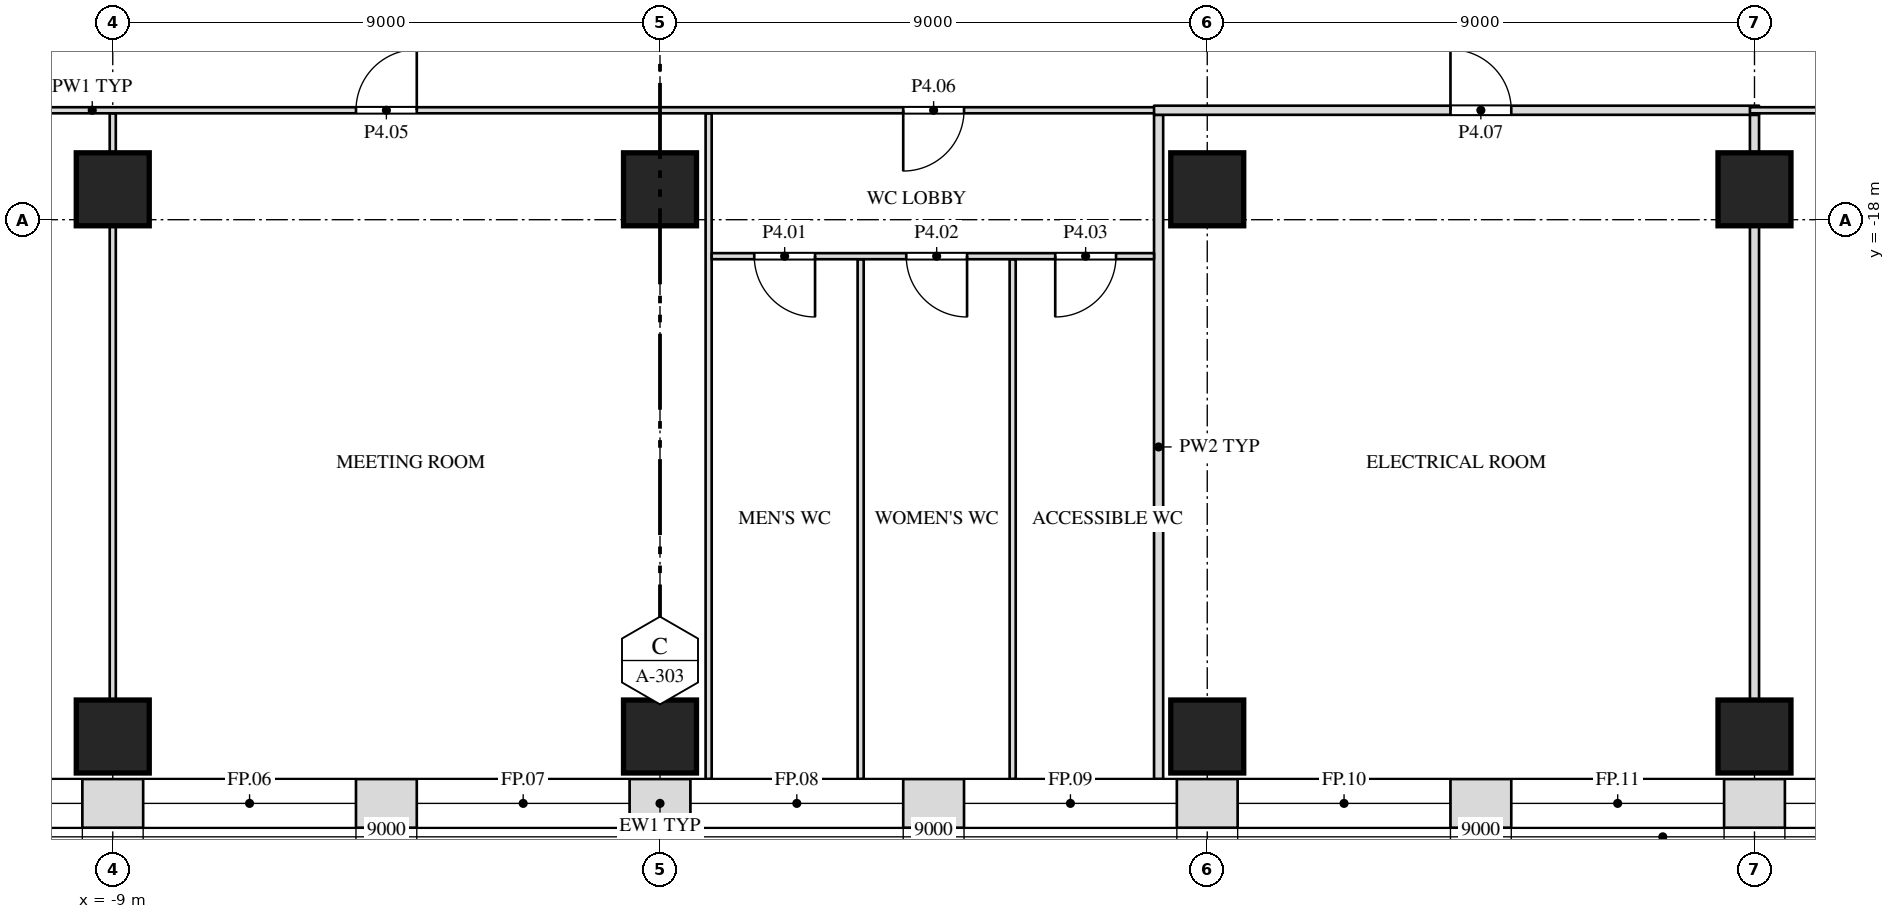
"""IFC4 building model, lengths in metres.
Left out: names, types, materials, properties, quantities, classifications, styles, units other than length and angle.
Written with IfcOpenShell. Run it as: python <this file> out.ifc"""

import sys

from ifc_helpers import new_model, si_unit, direction, frame, frame_2d, origin, origin_2d, place, context, subcontext, project, spatial, rectangle, extrude, element, fill, save


model = new_model("IFC4")
c1 = context("Model", 3, precision=1e-05, world=origin(), true_north=direction((0.0, 1.0)))
c2 = subcontext(c1, "Body", "Model", "MODEL_VIEW")
j1 = project(units=[si_unit("LENGTHUNIT", "METRE"), si_unit("PLANEANGLEUNIT", "RADIAN")], contexts=[c1])
p1 = place(None, origin())
s1 = spatial("IfcSite", under=j1, at=p1, CompositionType="ELEMENT")
p2 = place(p1, origin())
s2 = spatial("IfcBuilding", under=s1, at=p2, CompositionType="ELEMENT")
p3 = place(p2, frame((0.0, 0.0, 27.0)))
s3 = spatial("IfcBuildingStorey", under=s2, at=p3, CompositionType="ELEMENT", Elevation=27.0)
for number, where, z_axis, x_axis in (
    (1, (-9.0, -26.5, 0.0), (0.0, 0.0, 1.0), (1.0, 0.0, 0.0)),
    (2, (0.0, -26.5, 0.0), (0.0, 0.0, 1.0), (1.0, 0.0, 0.0)),
    (3, (9.0, -26.5, 0.0), (0.0, 0.0, 1.0), (1.0, 0.0, 0.0)),
    (4, (18.0, -26.5, 0.0), (0.0, 0.0, 1.0), (1.0, 0.0, 0.0)),
    (5, (-9.0, -17.5, 0.0), (0.0, 0.0, 1.0), (1.0, 0.0, 0.0)),
    (6, (0.0, -17.5, 0.0), (0.0, 0.0, 1.0), (1.0, 0.0, 0.0)),
    (7, (9.0, -17.5, 0.0), (0.0, 0.0, 1.0), (1.0, 0.0, 0.0)),
    (8, (18.0, -17.5, 0.0), (0.0, 0.0, 1.0), (1.0, 0.0, 0.0)),
):
    element("IfcColumn", number, at=place(p3, frame(where, z_axis=z_axis, x_axis=x_axis)), inside=s3, PredefinedType="COLUMN", context=c2, shape_type="SweptSolid", body=[
        extrude(rectangle(XDim=1.2, YDim=1.2, at=origin_2d()), origin(), (0.0, 0.0, 1.0), 6.0),
    ])
p4 = place(p3, frame((-9.0, -25.9, 0.0), z_axis=(0.0, 0.0, 1.0), x_axis=(0.0, 1.0, 0.0)))
e9 = element("IfcWall", 9, at=p4, inside=s3, PredefinedType="PARTITIONING", context=c2, shape_type="SweptSolid", body=[
    extrude(rectangle(XDim=7.8, YDim=0.1, at=frame_2d((3.9, 0.0))), origin(), (0.0, 0.0, 1.0), 5.088),
])
p5 = place(p3, frame((-9.0, -16.9, 0.0), z_axis=(0.0, 0.0, 1.0), x_axis=(0.0, 1.0, 0.0)))
e10 = element("IfcWall", 10, at=p5, inside=s3, PredefinedType="PARTITIONING", context=c2, shape_type="SweptSolid", body=[
    extrude(rectangle(XDim=0.65, YDim=0.1, at=frame_2d((0.325, 0.0))), origin(), (0.0, 0.0, 1.0), 5.7),
])
p6 = place(p3, frame((0.8, -27.2, 0.0), z_axis=(0.0, 0.0, 1.0), x_axis=(0.0, 1.0, 0.0)))
e11 = element("IfcWall", 11, at=p6, inside=s3, PredefinedType="PARTITIONING", context=c2, shape_type="SweptSolid", body=[
    extrude(rectangle(XDim=10.95, YDim=0.1, at=frame_2d((5.475, 0.0))), origin(), (0.0, 0.0, 1.0), 5.7),
])
for number, where, z_axis, x_axis in (
    (12, (3.3, -27.2, 0.0), (0.0, 0.0, 1.0), (0.0, 1.0, 0.0)),
    (13, (5.8, -27.2, 0.0), (0.0, 0.0, 1.0), (0.0, 1.0, 0.0)),
):
    element("IfcWall", number, at=place(p3, frame(where, z_axis=z_axis, x_axis=x_axis)), inside=s3, PredefinedType="PARTITIONING", context=c2, shape_type="SweptSolid", body=[
        extrude(rectangle(XDim=8.55, YDim=0.1, at=frame_2d((4.275, 0.0))), origin(), (0.0, 0.0, 1.0), 5.7),
    ])
p7 = place(p3, frame((8.2, -27.2, 0.0), z_axis=(0.0, 0.0, 1.0), x_axis=(0.0, 1.0, 0.0)))
e14 = element("IfcWall", 14, at=p7, inside=s3, PredefinedType="PARTITIONING", context=c2, shape_type="SweptSolid", body=[
    extrude(rectangle(XDim=10.925, YDim=0.15, at=frame_2d((5.462, 0.0))), origin(), (0.0, 0.0, 1.0), 5.7),
])
p8 = place(p3, frame((18.0, -25.9, 0.0), z_axis=(0.0, 0.0, 1.0), x_axis=(0.0, 1.0, 0.0)))
e15 = element("IfcWall", 15, at=p8, inside=s3, PredefinedType="PARTITIONING", context=c2, shape_type="SweptSolid", body=[
    extrude(rectangle(XDim=7.8, YDim=0.15, at=frame_2d((3.9, 0.0))), origin(), (0.0, 0.0, 1.0), 5.088),
])
p9 = place(p3, frame((18.0, -16.9, 0.0), z_axis=(0.0, 0.0, 1.0), x_axis=(0.0, 1.0, 0.0)))
e16 = element("IfcWall", 16, at=p9, inside=s3, PredefinedType="PARTITIONING", context=c2, shape_type="SweptSolid", body=[
    extrude(rectangle(XDim=0.625, YDim=0.15, at=frame_2d((0.312, 0.0))), origin(), (0.0, 0.0, 1.0), 5.7),
])
p10 = place(p3, frame((0.85, -18.6, 0.0), z_axis=(0.0, 0.0, 1.0), x_axis=(1.0, 0.0, 0.0)))
e17 = element("IfcWall", 17, at=p10, inside=s3, PredefinedType="PARTITIONING", context=c2, shape_type="SweptSolid", body=[
    extrude(rectangle(XDim=7.275, YDim=0.1, at=frame_2d((3.637, 0.0))), origin(), (0.0, 0.0, 1.0), 5.7),
])
p11 = place(p10, frame((0.7, 0.0, 0.0)))
e18 = element("IfcOpeningElement", 18, at=p11, cuts=e17, PredefinedType="OPENING", context=c2, shape_type="SweptSolid", body=[
    extrude(rectangle(XDim=1.0, YDim=2.1, at=frame_2d((0.5, 1.05))), frame((0.0, 0.062, 0.0), z_axis=(0.0, -1.0, 0.0), x_axis=(1.0, 0.0, 0.0)), (0.0, 0.0, 1.0), 0.124),
])
p12 = place(p10, frame((3.2, 0.0, 0.0)))
e19 = element("IfcOpeningElement", 19, at=p12, cuts=e17, PredefinedType="OPENING", context=c2, shape_type="SweptSolid", body=[
    extrude(rectangle(XDim=1.0, YDim=2.1, at=frame_2d((0.5, 1.05))), frame((0.0, 0.062, 0.0), z_axis=(0.0, -1.0, 0.0), x_axis=(1.0, 0.0, 0.0)), (0.0, 0.0, 1.0), 0.124),
])
p13 = place(p10, frame((5.65, 0.0, 0.0)))
e20 = element("IfcOpeningElement", 20, at=p13, cuts=e17, PredefinedType="OPENING", context=c2, shape_type="SweptSolid", body=[
    extrude(rectangle(XDim=1.0, YDim=2.1, at=frame_2d((0.5, 1.05))), frame((0.0, 0.062, 0.0), z_axis=(0.0, -1.0, 0.0), x_axis=(1.0, 0.0, 0.0)), (0.0, 0.0, 1.0), 0.124),
])
p14 = place(p3, frame((-26.95, -16.2, 0.0), z_axis=(0.0, 0.0, 1.0), x_axis=(1.0, 0.0, 0.0)))
e21 = element("IfcWall", 21, at=p14, inside=s3, PredefinedType="PARTITIONING", context=c2, shape_type="SweptSolid", body=[
    extrude(rectangle(XDim=35.225, YDim=0.1, at=frame_2d((17.612, 0.0))), origin(), (0.0, 0.0, 1.0), 5.7),
])
p15 = place(p14, frame((3.95, 0.0, 0.0)))
e22 = element("IfcOpeningElement", 22, at=p15, cuts=e21, PredefinedType="OPENING", context=c2, shape_type="SweptSolid", body=[
    extrude(rectangle(XDim=1.0, YDim=2.1, at=frame_2d((0.5, 1.05))), frame((0.0, 0.062, 0.0), z_axis=(0.0, -1.0, 0.0), x_axis=(1.0, 0.0, 0.0)), (0.0, 0.0, 1.0), 0.124),
])
p16 = place(p14, frame((21.95, 0.0, 0.0)))
e23 = element("IfcOpeningElement", 23, at=p16, cuts=e21, PredefinedType="OPENING", context=c2, shape_type="SweptSolid", body=[
    extrude(rectangle(XDim=1.0, YDim=2.1, at=frame_2d((0.5, 1.05))), frame((0.0, 0.062, 0.0), z_axis=(0.0, -1.0, 0.0), x_axis=(1.0, 0.0, 0.0)), (0.0, 0.0, 1.0), 0.124),
])
p17 = place(p14, frame((30.95, 0.0, 0.0)))
e24 = element("IfcOpeningElement", 24, at=p17, cuts=e21, PredefinedType="OPENING", context=c2, shape_type="SweptSolid", body=[
    extrude(rectangle(XDim=1.0, YDim=2.1, at=frame_2d((0.5, 1.05))), frame((0.0, 0.062, 0.0), z_axis=(0.0, -1.0, 0.0), x_axis=(1.0, 0.0, 0.0)), (0.0, 0.0, 1.0), 0.124),
])
p18 = place(p3, frame((8.125, -16.2, 0.0), z_axis=(0.0, 0.0, 1.0), x_axis=(1.0, 0.0, 0.0)))
e25 = element("IfcWall", 25, at=p18, inside=s3, PredefinedType="PARTITIONING", context=c2, shape_type="SweptSolid", body=[
    extrude(rectangle(XDim=9.95, YDim=0.15, at=frame_2d((4.975, 0.0))), origin(), (0.0, 0.0, 1.0), 5.7),
])
p19 = place(p18, frame((4.875, 0.0, 0.0)))
e26 = element("IfcOpeningElement", 26, at=p19, cuts=e25, PredefinedType="OPENING", context=c2, shape_type="SweptSolid", body=[
    extrude(rectangle(XDim=1.0, YDim=2.1, at=frame_2d((0.5, 1.05))), frame((0.0, 0.087, 0.0), z_axis=(0.0, -1.0, 0.0), x_axis=(1.0, 0.0, 0.0)), (0.0, 0.0, 1.0), 0.174),
])
p20 = place(p3, frame((17.925, -16.2, 0.0), z_axis=(0.0, 0.0, 1.0), x_axis=(1.0, 0.0, 0.0)))
e27 = element("IfcWall", 27, at=p20, inside=s3, PredefinedType="PARTITIONING", context=c2, shape_type="SweptSolid", body=[
    extrude(rectangle(XDim=9.025, YDim=0.1, at=frame_2d((4.512, 0.0))), origin(), (0.0, 0.0, 1.0), 5.7),
])
p21 = place(p20, frame((4.075, 0.0, 0.0)))
e28 = element("IfcOpeningElement", 28, at=p21, cuts=e27, PredefinedType="OPENING", context=c2, shape_type="SweptSolid", body=[
    extrude(rectangle(XDim=1.0, YDim=2.1, at=frame_2d((0.5, 1.05))), frame((0.0, 0.062, 0.0), z_axis=(0.0, -1.0, 0.0), x_axis=(1.0, 0.0, 0.0)), (0.0, 0.0, 1.0), 0.124),
])
p22 = place(p3, frame((-32.948, -27.6, 0.0), z_axis=(0.0, 0.0, 1.0), x_axis=(1.0, 0.0, 0.0)))
e29 = element("IfcWall", 29, at=p22, inside=s3, PredefinedType="SOLIDWALL", context=c2, shape_type="SweptSolid", body=[
    extrude(rectangle(XDim=65.895, YDim=0.8, at=frame_2d((32.948, 0.0))), origin(), (0.0, 0.0, 1.0), 5.7),
])
p23 = place(p22, frame((1.948, 0.0, 1.0)))
e30 = element("IfcOpeningElement", 30, at=p23, cuts=e29, PredefinedType="OPENING", context=c2, shape_type="SweptSolid", body=[
    extrude(rectangle(XDim=3.5, YDim=4.0, at=frame_2d((1.75, 2.0))), frame((0.0, 0.412, 0.0), z_axis=(0.0, -1.0, 0.0), x_axis=(1.0, 0.0, 0.0)), (0.0, 0.0, 1.0), 0.824),
])
p24 = place(p22, frame((6.448, 0.0, 1.0)))
e31 = element("IfcOpeningElement", 31, at=p24, cuts=e29, PredefinedType="OPENING", context=c2, shape_type="SweptSolid", body=[
    extrude(rectangle(XDim=3.5, YDim=4.0, at=frame_2d((1.75, 2.0))), frame((0.0, 0.412, 0.0), z_axis=(0.0, -1.0, 0.0), x_axis=(1.0, 0.0, 0.0)), (0.0, 0.0, 1.0), 0.824),
])
p25 = place(p22, frame((10.948, 0.0, 1.0)))
e32 = element("IfcOpeningElement", 32, at=p25, cuts=e29, PredefinedType="OPENING", context=c2, shape_type="SweptSolid", body=[
    extrude(rectangle(XDim=3.5, YDim=4.0, at=frame_2d((1.75, 2.0))), frame((0.0, 0.412, 0.0), z_axis=(0.0, -1.0, 0.0), x_axis=(1.0, 0.0, 0.0)), (0.0, 0.0, 1.0), 0.824),
])
p26 = place(p22, frame((15.448, 0.0, 1.0)))
e33 = element("IfcOpeningElement", 33, at=p26, cuts=e29, PredefinedType="OPENING", context=c2, shape_type="SweptSolid", body=[
    extrude(rectangle(XDim=3.5, YDim=4.0, at=frame_2d((1.75, 2.0))), frame((0.0, 0.412, 0.0), z_axis=(0.0, -1.0, 0.0), x_axis=(1.0, 0.0, 0.0)), (0.0, 0.0, 1.0), 0.824),
])
p27 = place(p22, frame((19.948, 0.0, 1.0)))
e34 = element("IfcOpeningElement", 34, at=p27, cuts=e29, PredefinedType="OPENING", context=c2, shape_type="SweptSolid", body=[
    extrude(rectangle(XDim=3.5, YDim=4.0, at=frame_2d((1.75, 2.0))), frame((0.0, 0.412, 0.0), z_axis=(0.0, -1.0, 0.0), x_axis=(1.0, 0.0, 0.0)), (0.0, 0.0, 1.0), 0.824),
])
p28 = place(p22, frame((24.448, 0.0, 1.0)))
e35 = element("IfcOpeningElement", 35, at=p28, cuts=e29, PredefinedType="OPENING", context=c2, shape_type="SweptSolid", body=[
    extrude(rectangle(XDim=3.5, YDim=4.0, at=frame_2d((1.75, 2.0))), frame((0.0, 0.412, 0.0), z_axis=(0.0, -1.0, 0.0), x_axis=(1.0, 0.0, 0.0)), (0.0, 0.0, 1.0), 0.824),
])
p29 = place(p22, frame((28.948, 0.0, 1.0)))
e36 = element("IfcOpeningElement", 36, at=p29, cuts=e29, PredefinedType="OPENING", context=c2, shape_type="SweptSolid", body=[
    extrude(rectangle(XDim=3.5, YDim=4.0, at=frame_2d((1.75, 2.0))), frame((0.0, 0.412, 0.0), z_axis=(0.0, -1.0, 0.0), x_axis=(1.0, 0.0, 0.0)), (0.0, 0.0, 1.0), 0.824),
])
p30 = place(p22, frame((33.448, 0.0, 1.0)))
e37 = element("IfcOpeningElement", 37, at=p30, cuts=e29, PredefinedType="OPENING", context=c2, shape_type="SweptSolid", body=[
    extrude(rectangle(XDim=3.5, YDim=4.0, at=frame_2d((1.75, 2.0))), frame((0.0, 0.412, 0.0), z_axis=(0.0, -1.0, 0.0), x_axis=(1.0, 0.0, 0.0)), (0.0, 0.0, 1.0), 0.824),
])
p31 = place(p22, frame((37.948, 0.0, 1.0)))
e38 = element("IfcOpeningElement", 38, at=p31, cuts=e29, PredefinedType="OPENING", context=c2, shape_type="SweptSolid", body=[
    extrude(rectangle(XDim=3.5, YDim=4.0, at=frame_2d((1.75, 2.0))), frame((0.0, 0.412, 0.0), z_axis=(0.0, -1.0, 0.0), x_axis=(1.0, 0.0, 0.0)), (0.0, 0.0, 1.0), 0.824),
])
p32 = place(p22, frame((42.448, 0.0, 1.0)))
e39 = element("IfcOpeningElement", 39, at=p32, cuts=e29, PredefinedType="OPENING", context=c2, shape_type="SweptSolid", body=[
    extrude(rectangle(XDim=3.5, YDim=4.0, at=frame_2d((1.75, 2.0))), frame((0.0, 0.412, 0.0), z_axis=(0.0, -1.0, 0.0), x_axis=(1.0, 0.0, 0.0)), (0.0, 0.0, 1.0), 0.824),
])
p33 = place(p22, frame((46.948, 0.0, 1.0)))
e40 = element("IfcOpeningElement", 40, at=p33, cuts=e29, PredefinedType="OPENING", context=c2, shape_type="SweptSolid", body=[
    extrude(rectangle(XDim=3.5, YDim=4.0, at=frame_2d((1.75, 2.0))), frame((0.0, 0.412, 0.0), z_axis=(0.0, -1.0, 0.0), x_axis=(1.0, 0.0, 0.0)), (0.0, 0.0, 1.0), 0.824),
])
p34 = place(p22, frame((51.448, 0.0, 1.0)))
e41 = element("IfcOpeningElement", 41, at=p34, cuts=e29, PredefinedType="OPENING", context=c2, shape_type="SweptSolid", body=[
    extrude(rectangle(XDim=3.5, YDim=4.0, at=frame_2d((1.75, 2.0))), frame((0.0, 0.412, 0.0), z_axis=(0.0, -1.0, 0.0), x_axis=(1.0, 0.0, 0.0)), (0.0, 0.0, 1.0), 0.824),
])
p35 = place(p22, frame((55.948, 0.0, 1.0)))
e42 = element("IfcOpeningElement", 42, at=p35, cuts=e29, PredefinedType="OPENING", context=c2, shape_type="SweptSolid", body=[
    extrude(rectangle(XDim=3.5, YDim=4.0, at=frame_2d((1.75, 2.0))), frame((0.0, 0.412, 0.0), z_axis=(0.0, -1.0, 0.0), x_axis=(1.0, 0.0, 0.0)), (0.0, 0.0, 1.0), 0.824),
])
p36 = place(p22, frame((60.448, 0.0, 1.0)))
e43 = element("IfcOpeningElement", 43, at=p36, cuts=e29, PredefinedType="OPENING", context=c2, shape_type="SweptSolid", body=[
    extrude(rectangle(XDim=3.5, YDim=4.0, at=frame_2d((1.75, 2.0))), frame((0.0, 0.412, 0.0), z_axis=(0.0, -1.0, 0.0), x_axis=(1.0, 0.0, 0.0)), (0.0, 0.0, 1.0), 0.824),
])
p37 = place(p11, origin())
e44 = element("IfcDoor", 44, at=p37, inside=s3, OperationType="SINGLE_SWING_LEFT", PredefinedType="DOOR", context=c2, shape_type="SweptSolid", body=[
    extrude(rectangle(XDim=1.0, YDim=2.1, at=frame_2d((0.5, 1.05))), frame((0.0, 0.025, 0.0), z_axis=(0.0, -1.0, 0.0), x_axis=(1.0, 0.0, 0.0)), (0.0, 0.0, 1.0), 0.05),
])
fill(e18, e44)
p38 = place(p12, origin())
e45 = element("IfcDoor", 45, at=p38, inside=s3, OperationType="SINGLE_SWING_LEFT", PredefinedType="DOOR", context=c2, shape_type="SweptSolid", body=[
    extrude(rectangle(XDim=1.0, YDim=2.1, at=frame_2d((0.5, 1.05))), frame((0.0, 0.025, 0.0), z_axis=(0.0, -1.0, 0.0), x_axis=(1.0, 0.0, 0.0)), (0.0, 0.0, 1.0), 0.05),
])
fill(e19, e45)
p39 = place(p13, origin())
e46 = element("IfcDoor", 46, at=p39, inside=s3, OperationType="SINGLE_SWING_RIGHT", PredefinedType="DOOR", context=c2, shape_type="SweptSolid", body=[
    extrude(rectangle(XDim=1.0, YDim=2.1, at=frame_2d((0.5, 1.05))), frame((0.0, 0.025, 0.0), z_axis=(0.0, -1.0, 0.0), x_axis=(1.0, 0.0, 0.0)), (0.0, 0.0, 1.0), 0.05),
])
fill(e20, e46)
p40 = place(p16, origin())
e47 = element("IfcDoor", 47, at=p40, inside=s3, OperationType="SINGLE_SWING_RIGHT", PredefinedType="DOOR", context=c2, shape_type="SweptSolid", body=[
    extrude(rectangle(XDim=1.0, YDim=2.1, at=frame_2d((0.5, 1.05))), frame((0.0, 0.025, 0.0), z_axis=(0.0, -1.0, 0.0), x_axis=(1.0, 0.0, 0.0)), (0.0, 0.0, 1.0), 0.05),
])
fill(e23, e47)
p41 = place(p17, origin())
e48 = element("IfcDoor", 48, at=p41, inside=s3, OperationType="SINGLE_SWING_RIGHT", PredefinedType="DOOR", context=c2, shape_type="SweptSolid", body=[
    extrude(rectangle(XDim=1.0, YDim=2.1, at=frame_2d((0.5, 1.05))), frame((0.0, 0.025, 0.0), z_axis=(0.0, -1.0, 0.0), x_axis=(1.0, 0.0, 0.0)), (0.0, 0.0, 1.0), 0.05),
])
fill(e24, e48)
p42 = place(p19, origin())
e49 = element("IfcDoor", 49, at=p42, inside=s3, OperationType="SINGLE_SWING_LEFT", PredefinedType="DOOR", context=c2, shape_type="SweptSolid", body=[
    extrude(rectangle(XDim=1.0, YDim=2.1, at=frame_2d((0.5, 1.05))), frame((0.0, 0.025, 0.0), z_axis=(0.0, -1.0, 0.0), x_axis=(1.0, 0.0, 0.0)), (0.0, 0.0, 1.0), 0.05),
])
fill(e26, e49)
p43 = place(p27, origin())
e50 = element("IfcWindow", 50, at=p43, inside=s3, PartitioningType="SINGLE_PANEL", PredefinedType="WINDOW", context=c2, shape_type="SweptSolid", body=[
    extrude(rectangle(XDim=3.5, YDim=4.0, at=frame_2d((1.75, 2.0))), frame((0.0, 0.03, 0.0), z_axis=(0.0, -1.0, 0.0), x_axis=(1.0, 0.0, 0.0)), (0.0, 0.0, 1.0), 0.06),
])
fill(e34, e50)
p44 = place(p28, origin())
e51 = element("IfcWindow", 51, at=p44, inside=s3, PartitioningType="SINGLE_PANEL", PredefinedType="WINDOW", context=c2, shape_type="SweptSolid", body=[
    extrude(rectangle(XDim=3.5, YDim=4.0, at=frame_2d((1.75, 2.0))), frame((0.0, 0.03, 0.0), z_axis=(0.0, -1.0, 0.0), x_axis=(1.0, 0.0, 0.0)), (0.0, 0.0, 1.0), 0.06),
])
fill(e35, e51)
p45 = place(p29, origin())
e52 = element("IfcWindow", 52, at=p45, inside=s3, PartitioningType="SINGLE_PANEL", PredefinedType="WINDOW", context=c2, shape_type="SweptSolid", body=[
    extrude(rectangle(XDim=3.5, YDim=4.0, at=frame_2d((1.75, 2.0))), frame((0.0, 0.03, 0.0), z_axis=(0.0, -1.0, 0.0), x_axis=(1.0, 0.0, 0.0)), (0.0, 0.0, 1.0), 0.06),
])
fill(e36, e52)
p46 = place(p30, origin())
e53 = element("IfcWindow", 53, at=p46, inside=s3, PartitioningType="SINGLE_PANEL", PredefinedType="WINDOW", context=c2, shape_type="SweptSolid", body=[
    extrude(rectangle(XDim=3.5, YDim=4.0, at=frame_2d((1.75, 2.0))), frame((0.0, 0.03, 0.0), z_axis=(0.0, -1.0, 0.0), x_axis=(1.0, 0.0, 0.0)), (0.0, 0.0, 1.0), 0.06),
])
fill(e37, e53)
p47 = place(p31, origin())
e54 = element("IfcWindow", 54, at=p47, inside=s3, PartitioningType="SINGLE_PANEL", PredefinedType="WINDOW", context=c2, shape_type="SweptSolid", body=[
    extrude(rectangle(XDim=3.5, YDim=4.0, at=frame_2d((1.75, 2.0))), frame((0.0, 0.03, 0.0), z_axis=(0.0, -1.0, 0.0), x_axis=(1.0, 0.0, 0.0)), (0.0, 0.0, 1.0), 0.06),
])
fill(e38, e54)
p48 = place(p32, origin())
e55 = element("IfcWindow", 55, at=p48, inside=s3, PartitioningType="SINGLE_PANEL", PredefinedType="WINDOW", context=c2, shape_type="SweptSolid", body=[
    extrude(rectangle(XDim=3.5, YDim=4.0, at=frame_2d((1.75, 2.0))), frame((0.0, 0.03, 0.0), z_axis=(0.0, -1.0, 0.0), x_axis=(1.0, 0.0, 0.0)), (0.0, 0.0, 1.0), 0.06),
])
fill(e39, e55)
p49 = place(p33, origin())
e56 = element("IfcWindow", 56, at=p49, inside=s3, PartitioningType="SINGLE_PANEL", PredefinedType="WINDOW", context=c2, shape_type="SweptSolid", body=[
    extrude(rectangle(XDim=3.5, YDim=4.0, at=frame_2d((1.75, 2.0))), frame((0.0, 0.03, 0.0), z_axis=(0.0, -1.0, 0.0), x_axis=(1.0, 0.0, 0.0)), (0.0, 0.0, 1.0), 0.06),
])
fill(e40, e56)
p50 = place(p34, origin())
e57 = element("IfcWindow", 57, at=p50, inside=s3, PartitioningType="SINGLE_PANEL", PredefinedType="WINDOW", context=c2, shape_type="SweptSolid", body=[
    extrude(rectangle(XDim=3.5, YDim=4.0, at=frame_2d((1.75, 2.0))), frame((0.0, 0.03, 0.0), z_axis=(0.0, -1.0, 0.0), x_axis=(1.0, 0.0, 0.0)), (0.0, 0.0, 1.0), 0.06),
])
fill(e41, e57)
save(model, sys.argv[1])
